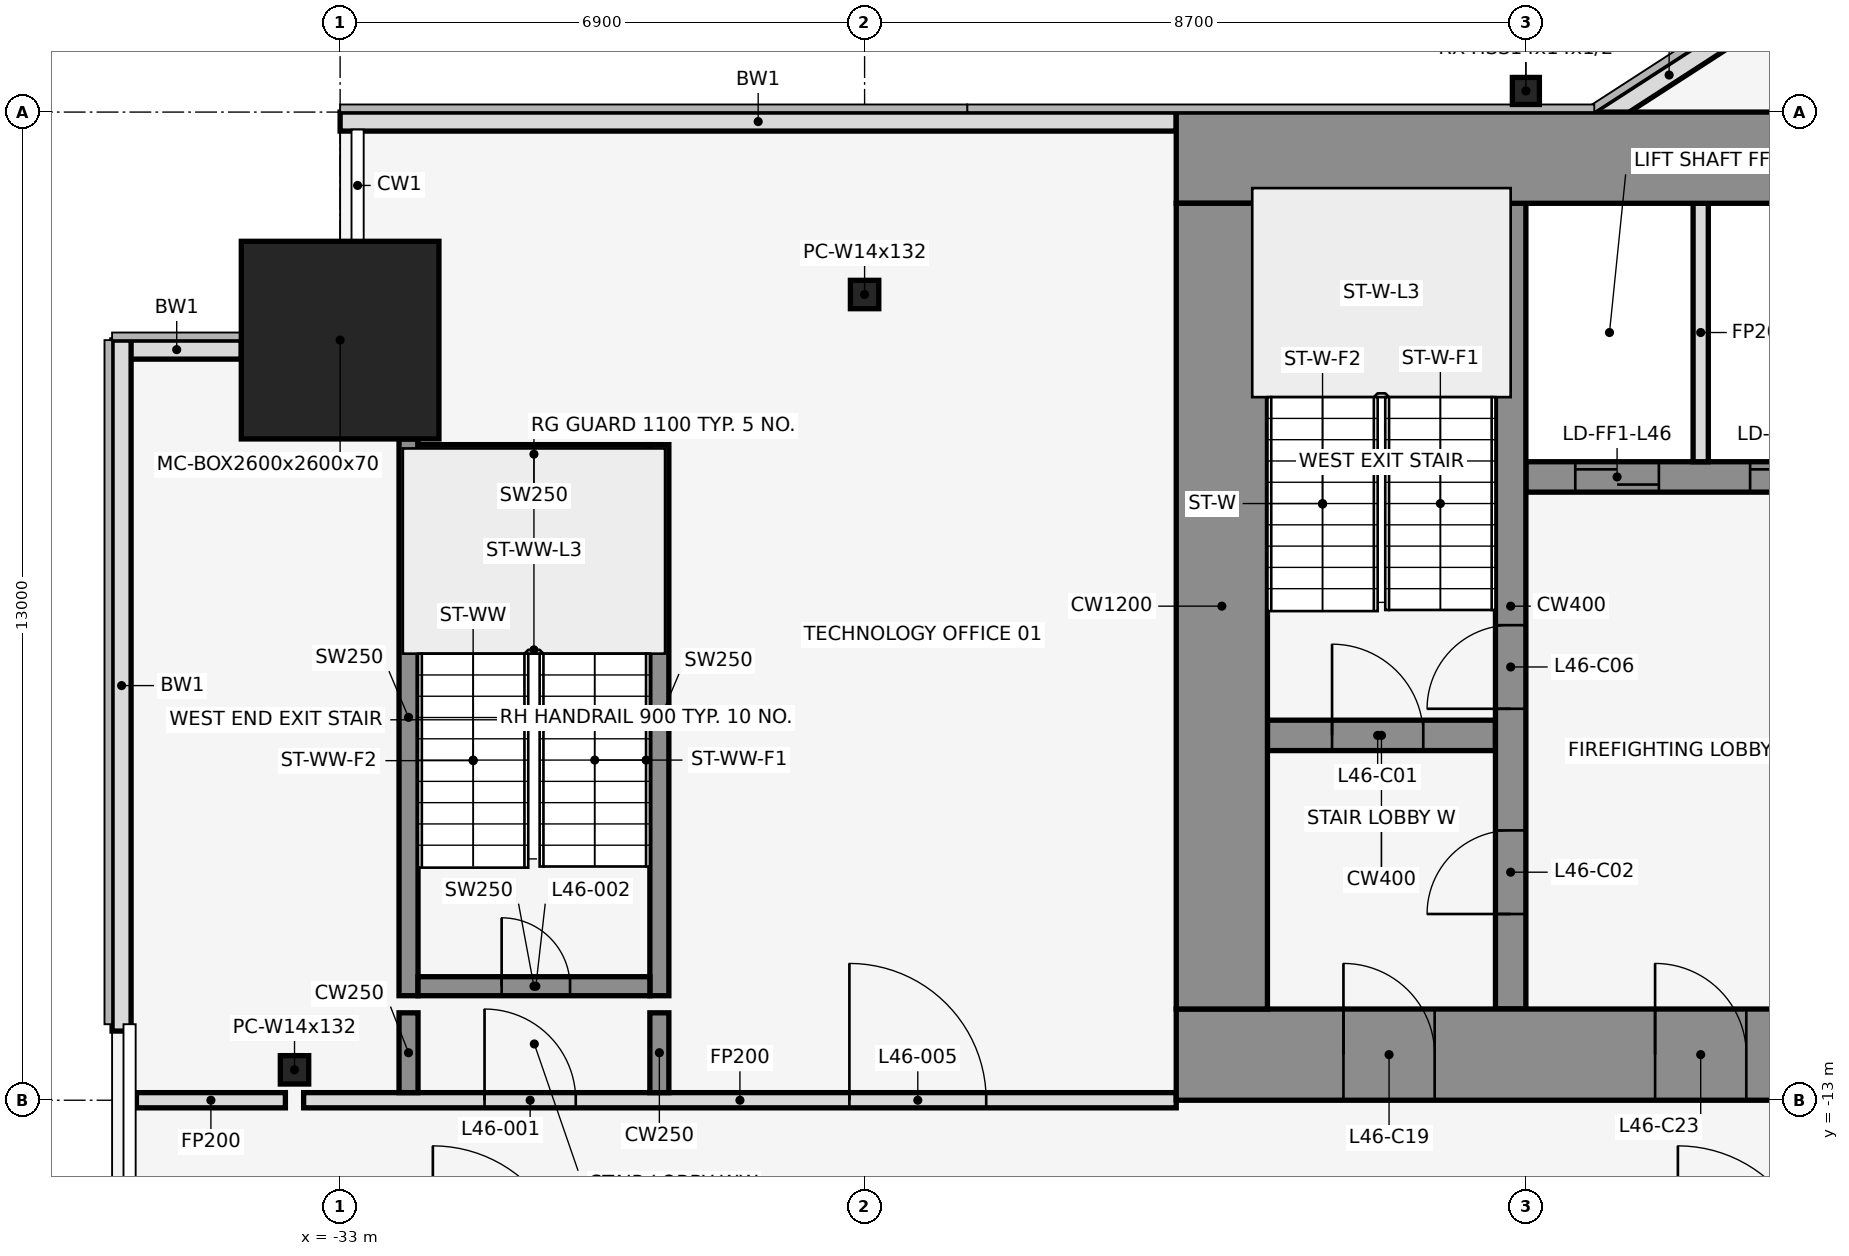
"""IFC4 building model, lengths in metres.
Left out: names, types, materials, properties, quantities, classifications, styles, units other than length and angle.
Written with IfcOpenShell. Run it as: python <this file> out.ifc"""

import sys

from ifc_helpers import new_model, si_unit, direction, frame, frame_2d, origin, origin_2d, place, context, subcontext, project, spatial, rectangle, hollow_rectangle, i_section, extrude, element, fill, save


model = new_model("IFC4")
c1 = context("Model", 3, precision=1e-05, world=origin(), true_north=direction((0.0, 1.0)))
c2 = subcontext(c1, "Body", "Model", "MODEL_VIEW")
j1 = project(units=[si_unit("LENGTHUNIT", "METRE"), si_unit("PLANEANGLEUNIT", "RADIAN")], contexts=[c1])
p1 = place(None, origin())
s1 = spatial("IfcSite", under=j1, at=p1, CompositionType="ELEMENT")
p2 = place(p1, origin())
s2 = spatial("IfcBuilding", under=s1, at=p2, CompositionType="ELEMENT")
p3 = place(p2, frame((0.0, 0.0, 207.3)))
s3 = spatial("IfcBuildingStorey", under=s2, at=p3, CompositionType="ELEMENT", Elevation=207.3)
p4 = place(p3, frame((-33.0, -3.0, 0.0), z_axis=(0.0, 0.0, 1.0), x_axis=(1.0, 0.0, 0.0)))
e1 = element("IfcColumn", 1, at=p4, inside=s3, PredefinedType="COLUMN", context=c2, shape_type="SweptSolid", body=[
    extrude(hollow_rectangle(XDim=2.6, YDim=2.6, WallThickness=0.07, at=origin_2d()), origin(), (0.0, 0.0, 1.0), 4.1),
])
p5 = place(p3, frame((-26.1, -2.4, 0.0), z_axis=(0.0, 0.0, 1.0), x_axis=(1.0, 0.0, 0.0)))
e2 = element("IfcColumn", 2, at=p5, inside=s3, PredefinedType="COLUMN", context=c2, shape_type="SweptSolid", body=[
    extrude(i_section(OverallWidth=0.373, OverallDepth=0.373, WebThickness=0.016, FlangeThickness=0.026, at=origin_2d()), origin(), (0.0, 0.0, 1.0), 4.1),
])
p6 = place(p3, frame((-17.4, 0.278, 0.0), z_axis=(0.0, 0.0, 1.0), x_axis=(1.0, 0.0, 0.0)))
e3 = element("IfcColumn", 3, at=p6, inside=s3, PredefinedType="COLUMN", context=c2, shape_type="SweptSolid", body=[
    extrude(hollow_rectangle(XDim=0.356, YDim=0.356, WallThickness=0.012, at=origin_2d()), origin(), (0.0, 0.0, 1.0), 4.1),
])
p7 = place(p3, frame((-33.6, -12.6, 0.0), z_axis=(0.0, 0.0, 1.0), x_axis=(1.0, 0.0, 0.0)))
e4 = element("IfcColumn", 4, at=p7, inside=s3, PredefinedType="COLUMN", context=c2, shape_type="SweptSolid", body=[
    extrude(i_section(OverallWidth=0.373, OverallDepth=0.373, WebThickness=0.016, FlangeThickness=0.026, at=origin_2d()), origin(), (0.0, 0.0, 1.0), 4.1),
])
p8 = place(p3, frame((-14.599, 1.08, 0.0), z_axis=(0.0, 0.0, 1.0), x_axis=(-0.83981312244, -0.542875602121, 0.0)))
e5 = element("IfcWall", 5, at=p8, inside=s3, PredefinedType="STANDARD", context=c2, shape_type="SweptSolid", body=[
    extrude(rectangle(XDim=2.183, YDim=0.25, at=frame_2d((1.091, 0.0))), origin(), (0.0, 0.0, 1.0), 3.95),
])
p9 = place(p3, frame((-22.0, -0.125, 0.0), z_axis=(0.0, 0.0, 1.0), x_axis=(-1.0, 0.0, 0.0)))
e6 = element("IfcWall", 6, at=p9, inside=s3, PredefinedType="STANDARD", context=c2, shape_type="SweptSolid", body=[
    extrude(rectangle(XDim=11.0, YDim=0.25, at=frame_2d((5.5, 0.0))), origin(), (0.0, 0.0, 1.0), 3.95),
])
p10 = place(p3, frame((-34.3, -3.125, 0.0), z_axis=(0.0, 0.0, 1.0), x_axis=(-1.0, 0.0, 0.0)))
e7 = element("IfcWall", 7, at=p10, inside=s3, PredefinedType="STANDARD", context=c2, shape_type="SweptSolid", body=[
    extrude(rectangle(XDim=1.7, YDim=0.25, at=frame_2d((0.85, 0.0))), origin(), (0.0, 0.0, 1.0), 3.95),
])
p11 = place(p3, frame((-35.875, -3.0, 0.0), z_axis=(0.0, 0.0, 1.0), x_axis=(0.0, -1.0, 0.0)))
e8 = element("IfcWall", 8, at=p11, inside=s3, PredefinedType="STANDARD", context=c2, shape_type="SweptSolid", body=[
    extrude(rectangle(XDim=9.09, YDim=0.25, at=frame_2d((4.545, 0.0))), origin(), (0.0, 0.0, 1.0), 3.95),
])
p12 = place(p3, frame((-32.1, -11.625, 0.0), z_axis=(0.0, 0.0, 1.0), x_axis=(0.0, 1.0, 0.0)))
e9 = element("IfcWall", 9, at=p12, inside=s3, PredefinedType="SHEAR", context=c2, shape_type="SweptSolid", body=[
    extrude(rectangle(XDim=7.325, YDim=0.25, at=frame_2d((3.663, 0.0))), origin(), (0.0, 0.0, 1.0), 4.1),
])
p13 = place(p3, frame((-28.8, -11.625, 0.0), z_axis=(0.0, 0.0, 1.0), x_axis=(0.0, 1.0, 0.0)))
e10 = element("IfcWall", 10, at=p13, inside=s3, PredefinedType="SHEAR", context=c2, shape_type="SweptSolid", body=[
    extrude(rectangle(XDim=7.25, YDim=0.25, at=frame_2d((3.625, 0.0))), origin(), (0.0, 0.0, 1.0), 4.1),
])
p14 = place(p3, frame((-31.975, -11.5, 0.0), z_axis=(0.0, 0.0, 1.0), x_axis=(1.0, 0.0, 0.0)))
e11 = element("IfcWall", 11, at=p14, inside=s3, PredefinedType="SHEAR", context=c2, shape_type="SweptSolid", body=[
    extrude(rectangle(XDim=3.05, YDim=0.25, at=frame_2d((1.525, 0.0))), origin(), (0.0, 0.0, 1.0), 4.1),
])
p15 = place(p14, frame((1.1, 0.0, 0.0)))
e12 = element("IfcOpeningElement", 12, at=p15, cuts=e11, PredefinedType="OPENING", context=c2, shape_type="SweptSolid", body=[
    extrude(rectangle(XDim=0.9, YDim=2.1, at=frame_2d((0.45, 1.05))), frame((0.0, 0.137, 0.0), z_axis=(0.0, -1.0, 0.0), x_axis=(1.0, 0.0, 0.0)), (0.0, 0.0, 1.0), 0.274),
])
p16 = place(p3, frame((-31.975, -4.5, 0.0), z_axis=(0.0, 0.0, 1.0), x_axis=(1.0, 0.0, 0.0)))
e13 = element("IfcWall", 13, at=p16, inside=s3, PredefinedType="SHEAR", context=c2, shape_type="SweptSolid", body=[
    extrude(rectangle(XDim=3.05, YDim=0.25, at=frame_2d((1.525, 0.0))), origin(), (0.0, 0.0, 1.0), 4.1),
])
p17 = place(p3, frame((-35.68, -13.0, 0.0), z_axis=(0.0, 0.0, 1.0), x_axis=(1.0, 0.0, 0.0)))
e14 = element("IfcWall", 14, at=p17, inside=s3, PredefinedType="PARTITIONING", context=c2, shape_type="SweptSolid", body=[
    extrude(rectangle(XDim=1.96, YDim=0.2, at=frame_2d((0.98, 0.0))), origin(), (0.0, 0.0, 1.0), 2.84),
])
p18 = place(p3, frame((-33.48, -13.0, 0.0), z_axis=(0.0, 0.0, 1.0), x_axis=(1.0, 0.0, 0.0)))
e15 = element("IfcWall", 15, at=p18, inside=s3, PredefinedType="PARTITIONING", context=c2, shape_type="SweptSolid", body=[
    extrude(rectangle(XDim=11.48, YDim=0.2, at=frame_2d((5.74, 0.0))), origin(), (0.0, 0.0, 1.0), 2.84),
])
p19 = place(p18, frame((2.38, 0.0, 0.0)))
e16 = element("IfcOpeningElement", 16, at=p19, cuts=e15, PredefinedType="OPENING", context=c2, shape_type="SweptSolid", body=[
    extrude(rectangle(XDim=1.2, YDim=2.1, at=frame_2d((0.6, 1.05))), frame((0.0, 0.112, 0.0), z_axis=(0.0, -1.0, 0.0), x_axis=(1.0, 0.0, 0.0)), (0.0, 0.0, 1.0), 0.224),
])
p20 = place(p18, frame((7.18, 0.0, 0.0)))
e17 = element("IfcOpeningElement", 17, at=p20, cuts=e15, PredefinedType="OPENING", context=c2, shape_type="SweptSolid", body=[
    extrude(rectangle(XDim=1.8, YDim=2.1, at=frame_2d((0.9, 1.05))), frame((0.0, 0.112, 0.0), z_axis=(0.0, -1.0, 0.0), x_axis=(1.0, 0.0, 0.0)), (0.0, 0.0, 1.0), 0.224),
])
for number, where, z_axis, x_axis in (
    (18, (-32.1, -12.9, 0.0), (0.0, 0.0, 1.0), (0.0, 1.0, 0.0)),
    (19, (-28.8, -12.9, 0.0), (0.0, 0.0, 1.0), (0.0, 1.0, 0.0)),
):
    element("IfcWall", number, at=place(p3, frame(where, z_axis=z_axis, x_axis=x_axis)), inside=s3, PredefinedType="SHEAR", context=c2, shape_type="SweptSolid", body=[
        extrude(rectangle(XDim=1.05, YDim=0.25, at=frame_2d((0.525, 0.0))), origin(), (0.0, 0.0, 1.0), 4.1),
    ])
p21 = place(p3, frame((-20.8, -8.2, 0.0), z_axis=(0.0, 0.0, 1.0), x_axis=(1.0, 0.0, 0.0)))
e20 = element("IfcWall", 20, at=p21, inside=s3, PredefinedType="SHEAR", context=c2, shape_type="SweptSolid", body=[
    extrude(rectangle(XDim=3.0, YDim=0.4, at=frame_2d((1.5, 0.0))), origin(), (0.0, 0.0, 1.0), 4.1),
])
p22 = place(p21, frame((0.85, 0.0, 0.0)))
e21 = element("IfcOpeningElement", 21, at=p22, cuts=e20, PredefinedType="OPENING", context=c2, shape_type="SweptSolid", body=[
    extrude(rectangle(XDim=1.2, YDim=2.1, at=frame_2d((0.6, 1.05))), frame((0.0, 0.212, 0.0), z_axis=(0.0, -1.0, 0.0), x_axis=(1.0, 0.0, 0.0)), (0.0, 0.0, 1.0), 0.424),
])
p23 = place(p3, frame((-17.4, -4.8, 0.0), z_axis=(0.0, 0.0, 1.0), x_axis=(1.0, 0.0, 0.0)))
e22 = element("IfcWall", 22, at=p23, inside=s3, PredefinedType="SHEAR", context=c2, shape_type="SweptSolid", body=[
    extrude(rectangle(XDim=13.6, YDim=0.4, at=frame_2d((6.8, 0.0))), origin(), (0.0, 0.0, 1.0), 4.1),
])
p24 = place(p23, frame((0.65, 0.0, 0.0)))
e23 = element("IfcOpeningElement", 23, at=p24, cuts=e22, PredefinedType="OPENING", context=c2, shape_type="SweptSolid", body=[
    extrude(rectangle(XDim=1.1, YDim=2.1, at=frame_2d((0.55, 1.05))), frame((0.0, 0.212, 0.0), z_axis=(0.0, -1.0, 0.0), x_axis=(1.0, 0.0, 0.0)), (0.0, 0.0, 1.0), 0.424),
])
p25 = place(p23, frame((2.95, 0.0, 0.0)))
e24 = element("IfcOpeningElement", 24, at=p25, cuts=e22, PredefinedType="OPENING", context=c2, shape_type="SweptSolid", body=[
    extrude(rectangle(XDim=1.1, YDim=2.1, at=frame_2d((0.55, 1.05))), frame((0.0, 0.212, 0.0), z_axis=(0.0, -1.0, 0.0), x_axis=(1.0, 0.0, 0.0)), (0.0, 0.0, 1.0), 0.424),
])
p26 = place(p23, frame((5.85, 0.0, 0.0)))
e25 = element("IfcOpeningElement", 25, at=p26, cuts=e22, PredefinedType="OPENING", context=c2, shape_type="SweptSolid", body=[
    extrude(rectangle(XDim=0.9, YDim=2.1, at=frame_2d((0.45, 1.05))), frame((0.0, 0.212, 0.0), z_axis=(0.0, -1.0, 0.0), x_axis=(1.0, 0.0, 0.0)), (0.0, 0.0, 1.0), 0.424),
])
p27 = place(p23, frame((10.25, 0.0, 0.0)))
e26 = element("IfcOpeningElement", 26, at=p27, cuts=e22, PredefinedType="OPENING", context=c2, shape_type="SweptSolid", body=[
    extrude(rectangle(XDim=0.9, YDim=2.1, at=frame_2d((0.45, 1.05))), frame((0.0, 0.212, 0.0), z_axis=(0.0, -1.0, 0.0), x_axis=(1.0, 0.0, 0.0)), (0.0, 0.0, 1.0), 0.424),
])
p28 = place(p3, frame((-17.6, -11.8, 0.0), z_axis=(0.0, 0.0, 1.0), x_axis=(0.0, 1.0, 0.0)))
e27 = element("IfcWall", 27, at=p28, inside=s3, PredefinedType="SHEAR", context=c2, shape_type="SweptSolid", body=[
    extrude(rectangle(XDim=10.6, YDim=0.4, at=frame_2d((5.3, 0.0))), origin(), (0.0, 0.0, 1.0), 4.1),
])
p29 = place(p28, frame((1.25, 0.0, 0.0)))
e28 = element("IfcOpeningElement", 28, at=p29, cuts=e27, PredefinedType="OPENING", context=c2, shape_type="SweptSolid", body=[
    extrude(rectangle(XDim=1.1, YDim=2.1, at=frame_2d((0.55, 1.05))), frame((0.0, 0.212, 0.0), z_axis=(0.0, -1.0, 0.0), x_axis=(1.0, 0.0, 0.0)), (0.0, 0.0, 1.0), 0.424),
])
p30 = place(p28, frame((3.95, 0.0, 0.0)))
e29 = element("IfcOpeningElement", 29, at=p30, cuts=e27, PredefinedType="OPENING", context=c2, shape_type="SweptSolid", body=[
    extrude(rectangle(XDim=1.1, YDim=2.1, at=frame_2d((0.55, 1.05))), frame((0.0, 0.212, 0.0), z_axis=(0.0, -1.0, 0.0), x_axis=(1.0, 0.0, 0.0)), (0.0, 0.0, 1.0), 0.424),
])
p31 = place(p3, frame((-15.1, -4.6, 0.0), z_axis=(0.0, 0.0, 1.0), x_axis=(0.0, 1.0, 0.0)))
e30 = element("IfcWall", 30, at=p31, inside=s3, PredefinedType="PARTITIONING", context=c2, shape_type="SweptSolid", body=[
    extrude(rectangle(XDim=3.4, YDim=0.2, at=frame_2d((1.7, 0.0))), origin(), (0.0, 0.0, 1.0), 2.84),
])
p32 = place(p3, frame((-22.0, -0.6, 0.0), z_axis=(0.0, 0.0, 1.0), x_axis=(1.0, 0.0, 0.0)))
e31 = element("IfcWall", 31, at=p32, inside=s3, PredefinedType="SHEAR", context=c2, shape_type="SweptSolid", body=[
    extrude(rectangle(XDim=44.0, YDim=1.2, at=frame_2d((22.0, 0.0))), origin(), (0.0, 0.0, 1.0), 4.1),
])
p33 = place(p32, frame((18.55, 0.0, 0.0)))
e32 = element("IfcOpeningElement", 32, at=p33, cuts=e31, PredefinedType="OPENING", context=c2, shape_type="SweptSolid", body=[
    extrude(rectangle(XDim=0.9, YDim=2.1, at=frame_2d((0.45, 1.05))), frame((0.0, 0.612, 0.0), z_axis=(0.0, -1.0, 0.0), x_axis=(1.0, 0.0, 0.0)), (0.0, 0.0, 1.0), 1.224),
])
p34 = place(p32, frame((24.55, 0.0, 0.0)))
e33 = element("IfcOpeningElement", 33, at=p34, cuts=e31, PredefinedType="OPENING", context=c2, shape_type="SweptSolid", body=[
    extrude(rectangle(XDim=0.9, YDim=2.1, at=frame_2d((0.45, 1.05))), frame((0.0, 0.612, 0.0), z_axis=(0.0, -1.0, 0.0), x_axis=(1.0, 0.0, 0.0)), (0.0, 0.0, 1.0), 1.224),
])
p35 = place(p3, frame((-22.0, -12.4, 0.0), z_axis=(0.0, 0.0, 1.0), x_axis=(1.0, 0.0, 0.0)))
e34 = element("IfcWall", 34, at=p35, inside=s3, PredefinedType="SHEAR", context=c2, shape_type="SweptSolid", body=[
    extrude(rectangle(XDim=44.0, YDim=1.2, at=frame_2d((22.0, 0.0))), origin(), (0.0, 0.0, 1.0), 4.1),
])
p36 = place(p35, frame((2.2, 0.0, 0.0)))
e35 = element("IfcOpeningElement", 35, at=p36, cuts=e34, PredefinedType="OPENING", context=c2, shape_type="SweptSolid", body=[
    extrude(rectangle(XDim=1.2, YDim=2.1, at=frame_2d((0.6, 1.05))), frame((0.0, 0.612, 0.0), z_axis=(0.0, -1.0, 0.0), x_axis=(1.0, 0.0, 0.0)), (0.0, 0.0, 1.0), 1.224),
])
p37 = place(p35, frame((21.4, 0.0, 0.0)))
e36 = element("IfcOpeningElement", 36, at=p37, cuts=e34, PredefinedType="OPENING", context=c2, shape_type="SweptSolid", body=[
    extrude(rectangle(XDim=1.2, YDim=2.1, at=frame_2d((0.6, 1.05))), frame((0.0, 0.612, 0.0), z_axis=(0.0, -1.0, 0.0), x_axis=(1.0, 0.0, 0.0)), (0.0, 0.0, 1.0), 1.224),
])
p38 = place(p35, frame((40.6, 0.0, 0.0)))
e37 = element("IfcOpeningElement", 37, at=p38, cuts=e34, PredefinedType="OPENING", context=c2, shape_type="SweptSolid", body=[
    extrude(rectangle(XDim=1.2, YDim=2.1, at=frame_2d((0.6, 1.05))), frame((0.0, 0.612, 0.0), z_axis=(0.0, -1.0, 0.0), x_axis=(1.0, 0.0, 0.0)), (0.0, 0.0, 1.0), 1.224),
])
p39 = place(p35, frame((16.0, 0.0, 0.0)))
e38 = element("IfcOpeningElement", 38, at=p39, cuts=e34, PredefinedType="OPENING", context=c2, shape_type="SweptSolid", body=[
    extrude(rectangle(XDim=1.8, YDim=2.1, at=frame_2d((0.9, 1.05))), frame((0.0, 0.612, 0.0), z_axis=(0.0, -1.0, 0.0), x_axis=(1.0, 0.0, 0.0)), (0.0, 0.0, 1.0), 1.224),
])
p40 = place(p35, frame((6.3, 0.0, 0.0)))
e39 = element("IfcOpeningElement", 39, at=p40, cuts=e34, PredefinedType="OPENING", context=c2, shape_type="SweptSolid", body=[
    extrude(rectangle(XDim=1.2, YDim=2.1, at=frame_2d((0.6, 1.05))), frame((0.0, 0.612, 0.0), z_axis=(0.0, -1.0, 0.0), x_axis=(1.0, 0.0, 0.0)), (0.0, 0.0, 1.0), 1.224),
])
p41 = place(p35, frame((26.2, 0.0, 0.0)))
e40 = element("IfcOpeningElement", 40, at=p41, cuts=e34, PredefinedType="OPENING", context=c2, shape_type="SweptSolid", body=[
    extrude(rectangle(XDim=1.8, YDim=2.1, at=frame_2d((0.9, 1.05))), frame((0.0, 0.612, 0.0), z_axis=(0.0, -1.0, 0.0), x_axis=(1.0, 0.0, 0.0)), (0.0, 0.0, 1.0), 1.224),
])
p42 = place(p35, frame((36.5, 0.0, 0.0)))
e41 = element("IfcOpeningElement", 41, at=p42, cuts=e34, PredefinedType="OPENING", context=c2, shape_type="SweptSolid", body=[
    extrude(rectangle(XDim=1.2, YDim=2.1, at=frame_2d((0.6, 1.05))), frame((0.0, 0.612, 0.0), z_axis=(0.0, -1.0, 0.0), x_axis=(1.0, 0.0, 0.0)), (0.0, 0.0, 1.0), 1.224),
])
p43 = place(p3, frame((-21.4, -11.8, 0.0), z_axis=(0.0, 0.0, 1.0), x_axis=(0.0, 1.0, 0.0)))
e42 = element("IfcWall", 42, at=p43, inside=s3, PredefinedType="SHEAR", context=c2, shape_type="SweptSolid", body=[
    extrude(rectangle(XDim=10.6, YDim=1.2, at=frame_2d((5.3, 0.0))), origin(), (0.0, 0.0, 1.0), 4.1),
])
p44 = place(p19, origin())
e43 = element("IfcDoor", 43, at=p44, inside=s3, OperationType="SINGLE_SWING_LEFT", PredefinedType="DOOR", context=c2, shape_type="SweptSolid", body=[
    extrude(rectangle(XDim=1.2, YDim=2.1, at=frame_2d((0.6, 1.05))), frame((0.0, 0.025, 0.0), z_axis=(0.0, -1.0, 0.0), x_axis=(1.0, 0.0, 0.0)), (0.0, 0.0, 1.0), 0.05),
])
fill(e16, e43)
p45 = place(p15, origin())
e44 = element("IfcDoor", 44, at=p45, inside=s3, OperationType="SINGLE_SWING_LEFT", PredefinedType="DOOR", context=c2, shape_type="SweptSolid", body=[
    extrude(rectangle(XDim=0.9, YDim=2.1, at=frame_2d((0.45, 1.05))), frame((0.0, 0.025, 0.0), z_axis=(0.0, -1.0, 0.0), x_axis=(1.0, 0.0, 0.0)), (0.0, 0.0, 1.0), 0.05),
])
fill(e12, e44)
p46 = place(p20, origin())
e45 = element("IfcDoor", 45, at=p46, inside=s3, OperationType="SINGLE_SWING_LEFT", PredefinedType="DOOR", context=c2, shape_type="SweptSolid", body=[
    extrude(rectangle(XDim=1.8, YDim=2.1, at=frame_2d((0.9, 1.05))), frame((0.0, 0.025, 0.0), z_axis=(0.0, -1.0, 0.0), x_axis=(1.0, 0.0, 0.0)), (0.0, 0.0, 1.0), 0.05),
])
fill(e17, e45)
p47 = place(p22, origin())
e46 = element("IfcDoor", 46, at=p47, inside=s3, OperationType="SINGLE_SWING_LEFT", PredefinedType="DOOR", context=c2, shape_type="SweptSolid", body=[
    extrude(rectangle(XDim=1.2, YDim=2.1, at=frame_2d((0.6, 1.05))), frame((0.0, 0.025, 0.0), z_axis=(0.0, -1.0, 0.0), x_axis=(1.0, 0.0, 0.0)), (0.0, 0.0, 1.0), 0.05),
])
fill(e21, e46)
p48 = place(p29, frame((1.1, 0.0, 0.0), z_axis=(0.0, 0.0, 1.0), x_axis=(-1.0, 0.0, 0.0)))
e47 = element("IfcDoor", 47, at=p48, inside=s3, OperationType="SINGLE_SWING_LEFT", PredefinedType="DOOR", context=c2, shape_type="SweptSolid", body=[
    extrude(rectangle(XDim=1.1, YDim=2.1, at=frame_2d((0.55, 1.05))), frame((0.0, 0.025, 0.0), z_axis=(0.0, -1.0, 0.0), x_axis=(1.0, 0.0, 0.0)), (0.0, 0.0, 1.0), 0.05),
])
fill(e28, e47)
p49 = place(p24, origin())
e48 = element("IfcDoor", 48, at=p49, inside=s3, OperationType="DOUBLE_DOOR_SLIDING", PredefinedType="DOOR", context=c2, shape_type="SweptSolid", body=[
    extrude(rectangle(XDim=1.1, YDim=2.1, at=frame_2d((0.55, 1.05))), frame((0.0, 0.025, 0.0), z_axis=(0.0, -1.0, 0.0), x_axis=(1.0, 0.0, 0.0)), (0.0, 0.0, 1.0), 0.05),
])
fill(e23, e48)
p50 = place(p25, origin())
e49 = element("IfcDoor", 49, at=p50, inside=s3, OperationType="DOUBLE_DOOR_SLIDING", PredefinedType="DOOR", context=c2, shape_type="SweptSolid", body=[
    extrude(rectangle(XDim=1.1, YDim=2.1, at=frame_2d((0.55, 1.05))), frame((0.0, 0.025, 0.0), z_axis=(0.0, -1.0, 0.0), x_axis=(1.0, 0.0, 0.0)), (0.0, 0.0, 1.0), 0.05),
])
fill(e24, e49)
p51 = place(p30, frame((1.1, 0.0, 0.0), z_axis=(0.0, 0.0, 1.0), x_axis=(-1.0, 0.0, 0.0)))
e50 = element("IfcDoor", 50, at=p51, inside=s3, OperationType="SINGLE_SWING_LEFT", PredefinedType="DOOR", context=c2, shape_type="SweptSolid", body=[
    extrude(rectangle(XDim=1.1, YDim=2.1, at=frame_2d((0.55, 1.05))), frame((0.0, 0.025, 0.0), z_axis=(0.0, -1.0, 0.0), x_axis=(1.0, 0.0, 0.0)), (0.0, 0.0, 1.0), 0.05),
])
fill(e29, e50)
p52 = place(p36, frame((1.2, 0.0, 0.0), z_axis=(0.0, 0.0, 1.0), x_axis=(-1.0, 0.0, 0.0)))
e51 = element("IfcDoor", 51, at=p52, inside=s3, OperationType="SINGLE_SWING_RIGHT", PredefinedType="DOOR", context=c2, shape_type="SweptSolid", body=[
    extrude(rectangle(XDim=1.2, YDim=2.1, at=frame_2d((0.6, 1.05))), frame((0.0, 0.025, 0.0), z_axis=(0.0, -1.0, 0.0), x_axis=(1.0, 0.0, 0.0)), (0.0, 0.0, 1.0), 0.05),
])
fill(e35, e51)
p53 = place(p40, frame((1.2, 0.0, 0.0), z_axis=(0.0, 0.0, 1.0), x_axis=(-1.0, 0.0, 0.0)))
e52 = element("IfcDoor", 52, at=p53, inside=s3, OperationType="SINGLE_SWING_RIGHT", PredefinedType="DOOR", context=c2, shape_type="SweptSolid", body=[
    extrude(rectangle(XDim=1.2, YDim=2.1, at=frame_2d((0.6, 1.05))), frame((0.0, 0.025, 0.0), z_axis=(0.0, -1.0, 0.0), x_axis=(1.0, 0.0, 0.0)), (0.0, 0.0, 1.0), 0.05),
])
fill(e39, e52)
save(model, sys.argv[1])
